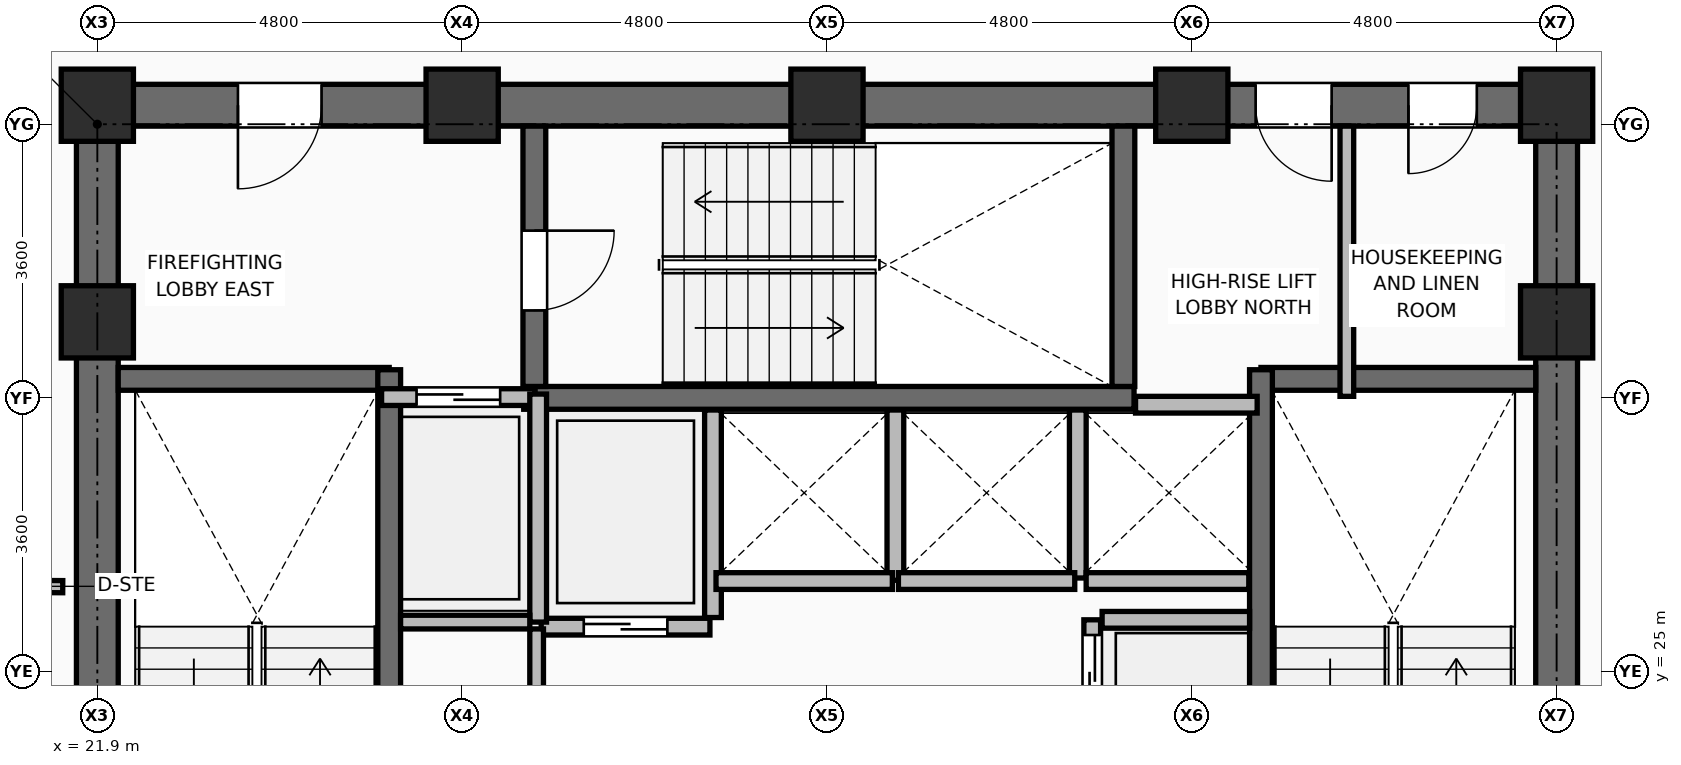
"""IFC4 building model, lengths in metres.
Left out: names, types, materials, properties, quantities, classifications, styles, units other than length and angle.
Written with IfcOpenShell. Run it as: python <this file> out.ifc"""

import sys

from ifc_helpers import new_model, si_unit, direction, frame, frame_2d, origin, origin_2d, place, context, subcontext, project, spatial, rectangle, extrude, element, fill, save


model = new_model("IFC4")
c1 = context("Model", 3, precision=1e-05, world=origin(), true_north=direction((0.0, 1.0)))
c2 = subcontext(c1, "Body", "Model", "MODEL_VIEW")
j1 = project(units=[si_unit("LENGTHUNIT", "METRE"), si_unit("PLANEANGLEUNIT", "RADIAN")], contexts=[c1])
p1 = place(None, origin())
s1 = spatial("IfcSite", under=j1, at=p1, CompositionType="ELEMENT")
p2 = place(p1, origin())
s2 = spatial("IfcBuilding", under=s1, at=p2, CompositionType="ELEMENT")
p3 = place(p2, frame((0.0, 0.0, 168.45)))
s3 = spatial("IfcBuildingStorey", under=s2, at=p3, CompositionType="ELEMENT", Elevation=168.45)
for number, where, z_axis, x_axis in (
    (1, (21.9, 29.6, 0.0), (0.0, 0.0, 1.0), (1.0, 0.0, 0.0)),
    (2, (41.1, 29.6, 0.0), (0.0, 0.0, 1.0), (1.0, 0.0, 0.0)),
    (3, (21.9, 32.45, 0.0), (0.0, 0.0, 1.0), (1.0, 0.0, 0.0)),
    (4, (26.7, 32.45, 0.0), (0.0, 0.0, 1.0), (1.0, 0.0, 0.0)),
    (5, (31.5, 32.45, 0.0), (0.0, 0.0, 1.0), (1.0, 0.0, 0.0)),
    (6, (36.3, 32.45, 0.0), (0.0, 0.0, 1.0), (1.0, 0.0, 0.0)),
    (7, (41.1, 32.45, 0.0), (0.0, 0.0, 1.0), (1.0, 0.0, 0.0)),
):
    element("IfcColumn", number, at=place(p3, frame(where, z_axis=z_axis, x_axis=x_axis)), inside=s3, PredefinedType="COLUMN", context=c2, shape_type="SweptSolid", body=[
        extrude(rectangle(XDim=0.95, YDim=0.95, at=origin_2d()), origin(), (0.0, 0.0, 1.0), 3.75),
    ])
p4 = place(p3, frame((30.0, 25.71, 0.0), z_axis=(0.0, 0.0, 1.0), x_axis=(0.0, 1.0, 0.0)))
e8 = element("IfcWall", 8, at=p4, inside=s3, PredefinedType="PARTITIONING", context=c2, shape_type="SweptSolid", body=[
    extrude(rectangle(XDim=2.73, YDim=0.22, at=frame_2d((1.365, 0.0))), origin(), (0.0, 0.0, 1.0), 3.545),
])
p5 = place(p3, frame((32.4, 26.2, 0.0), z_axis=(0.0, 0.0, 1.0), x_axis=(0.0, 1.0, 0.0)))
e9 = element("IfcWall", 9, at=p5, inside=s3, PredefinedType="PARTITIONING", context=c2, shape_type="SweptSolid", body=[
    extrude(rectangle(XDim=2.24, YDim=0.22, at=frame_2d((1.12, 0.0))), origin(), (0.0, 0.0, 1.0), 3.545),
])
p6 = place(p3, frame((34.8, 26.23, 0.0), z_axis=(0.0, 0.0, 1.0), x_axis=(0.0, 1.0, 0.0)))
e10 = element("IfcWall", 10, at=p6, inside=s3, PredefinedType="PARTITIONING", context=c2, shape_type="SweptSolid", body=[
    extrude(rectangle(XDim=2.21, YDim=0.22, at=frame_2d((1.105, 0.0))), origin(), (0.0, 0.0, 1.0), 3.545),
])
p7 = place(p3, frame((34.91, 26.19, 0.0), z_axis=(0.0, 0.0, 1.0), x_axis=(1.0, 0.0, 0.0)))
e11 = element("IfcWall", 11, at=p7, inside=s3, PredefinedType="PARTITIONING", context=c2, shape_type="SweptSolid", body=[
    extrude(rectangle(XDim=2.14, YDim=0.22, at=frame_2d((1.07, 0.0))), origin(), (0.0, 0.0, 1.0), 3.545),
])
p8 = place(p3, frame((21.625, 32.45, 0.0), z_axis=(0.0, 0.0, 1.0), x_axis=(1.0, 0.0, 0.0)))
e12 = element("IfcWall", 12, at=p8, inside=s3, PredefinedType="SHEAR", context=c2, shape_type="SweptSolid", body=[
    extrude(rectangle(XDim=19.75, YDim=0.55, at=frame_2d((9.875, 0.0))), origin(), (0.0, 0.0, 1.0), 3.57),
])
p9 = place(p8, frame((2.125, 0.0, 0.0)))
e13 = element("IfcOpeningElement", 13, at=p9, cuts=e12, PredefinedType="OPENING", context=c2, shape_type="SweptSolid", body=[
    extrude(rectangle(XDim=1.1, YDim=2.1, at=frame_2d((0.55, 1.05))), frame((0.0, 0.285, 0.0), z_axis=(0.0, -1.0, 0.0), x_axis=(1.0, 0.0, 0.0)), (0.0, 0.0, 1.0), 0.57),
])
p10 = place(p8, frame((15.515, 0.0, 0.0)))
e14 = element("IfcOpeningElement", 14, at=p10, cuts=e12, PredefinedType="OPENING", context=c2, shape_type="SweptSolid", body=[
    extrude(rectangle(XDim=1.0, YDim=2.1, at=frame_2d((0.5, 1.05))), frame((0.0, 0.285, 0.0), z_axis=(0.0, -1.0, 0.0), x_axis=(1.0, 0.0, 0.0)), (0.0, 0.0, 1.0), 0.57),
])
p11 = place(p8, frame((17.525, 0.0, 0.0)))
e15 = element("IfcOpeningElement", 15, at=p11, cuts=e12, PredefinedType="OPENING", context=c2, shape_type="SweptSolid", body=[
    extrude(rectangle(XDim=0.9, YDim=2.1, at=frame_2d((0.45, 1.05))), frame((0.0, 0.285, 0.0), z_axis=(0.0, -1.0, 0.0), x_axis=(1.0, 0.0, 0.0)), (0.0, 0.0, 1.0), 0.57),
])
p12 = place(p3, frame((21.9, 18.075, 0.0), z_axis=(0.0, 0.0, 1.0), x_axis=(0.0, 1.0, 0.0)))
e16 = element("IfcWall", 16, at=p12, inside=s3, PredefinedType="SHEAR", context=c2, shape_type="SweptSolid", body=[
    extrude(rectangle(XDim=14.1, YDim=0.55, at=frame_2d((7.05, 0.0))), origin(), (0.0, 0.0, 1.0), 3.57),
])
p13 = place(p3, frame((41.1, 18.075, 0.0), z_axis=(0.0, 0.0, 1.0), x_axis=(0.0, 1.0, 0.0)))
e17 = element("IfcWall", 17, at=p13, inside=s3, PredefinedType="SHEAR", context=c2, shape_type="SweptSolid", body=[
    extrude(rectangle(XDim=14.1, YDim=0.55, at=frame_2d((7.05, 0.0))), origin(), (0.0, 0.0, 1.0), 3.57),
])
p14 = place(p13, frame((3.385, 0.0, 0.0)))
e18 = element("IfcOpeningElement", 18, at=p14, cuts=e17, PredefinedType="OPENING", context=c2, shape_type="SweptSolid", body=[
    extrude(rectangle(XDim=1.05, YDim=2.1, at=frame_2d((0.525, 1.05))), frame((0.0, 0.285, 0.0), z_axis=(0.0, -1.0, 0.0), x_axis=(1.0, 0.0, 0.0)), (0.0, 0.0, 1.0), 0.57),
])
p15 = place(p3, frame((22.175, 28.85, 0.0), z_axis=(0.0, 0.0, 1.0), x_axis=(1.0, 0.0, 0.0)))
e19 = element("IfcWall", 19, at=p15, inside=s3, PredefinedType="SHEAR", context=c2, shape_type="SweptSolid", body=[
    extrude(rectangle(XDim=3.565, YDim=0.3, at=frame_2d((1.782, 0.0))), origin(), (0.0, 0.0, 1.0), 3.57),
])
p16 = place(p3, frame((25.74, 20.98, 0.0), z_axis=(0.0, 0.0, 1.0), x_axis=(0.0, 1.0, 0.0)))
e20 = element("IfcWall", 20, at=p16, inside=s3, PredefinedType="SHEAR", context=c2, shape_type="SweptSolid", body=[
    extrude(rectangle(XDim=7.99, YDim=0.3, at=frame_2d((3.995, 0.0))), origin(), (0.0, 0.0, 1.0), 3.57),
])
p17 = place(p3, frame((37.21, 28.85, 0.0), z_axis=(0.0, 0.0, 1.0), x_axis=(1.0, 0.0, 0.0)))
e21 = element("IfcWall", 21, at=p17, inside=s3, PredefinedType="SHEAR", context=c2, shape_type="SweptSolid", body=[
    extrude(rectangle(XDim=3.615, YDim=0.3, at=frame_2d((1.808, 0.0))), origin(), (0.0, 0.0, 1.0), 3.57),
])
p18 = place(p3, frame((37.21, 20.98, 0.0), z_axis=(0.0, 0.0, 1.0), x_axis=(0.0, 1.0, 0.0)))
e22 = element("IfcWall", 22, at=p18, inside=s3, PredefinedType="SHEAR", context=c2, shape_type="SweptSolid", body=[
    extrude(rectangle(XDim=7.99, YDim=0.3, at=frame_2d((3.995, 0.0))), origin(), (0.0, 0.0, 1.0), 3.57),
])
p19 = place(p3, frame((27.51, 28.6, 0.0), z_axis=(0.0, 0.0, 1.0), x_axis=(1.0, 0.0, 0.0)))
e23 = element("IfcWall", 23, at=p19, inside=s3, PredefinedType="SHEAR", context=c2, shape_type="SweptSolid", body=[
    extrude(rectangle(XDim=8.03, YDim=0.3, at=frame_2d((4.015, 0.0))), origin(), (0.0, 0.0, 1.0), 3.57),
])
p20 = place(p3, frame((27.65, 28.75, 0.0), z_axis=(0.0, 0.0, 1.0), x_axis=(0.0, 1.0, 0.0)))
e24 = element("IfcWall", 24, at=p20, inside=s3, PredefinedType="SHEAR", context=c2, shape_type="SweptSolid", body=[
    extrude(rectangle(XDim=3.425, YDim=0.3, at=frame_2d((1.712, 0.0))), origin(), (0.0, 0.0, 1.0), 3.57),
])
p21 = place(p20, frame((1.0, 0.0, 0.0)))
e25 = element("IfcOpeningElement", 25, at=p21, cuts=e24, PredefinedType="OPENING", context=c2, shape_type="SweptSolid", body=[
    extrude(rectangle(XDim=1.05, YDim=2.1, at=frame_2d((0.525, 1.05))), frame((0.0, 0.16, 0.0), z_axis=(0.0, -1.0, 0.0), x_axis=(1.0, 0.0, 0.0)), (0.0, 0.0, 1.0), 0.32),
])
p22 = place(p3, frame((35.4, 28.75, 0.0), z_axis=(0.0, 0.0, 1.0), x_axis=(0.0, 1.0, 0.0)))
e26 = element("IfcWall", 26, at=p22, inside=s3, PredefinedType="SHEAR", context=c2, shape_type="SweptSolid", body=[
    extrude(rectangle(XDim=3.425, YDim=0.3, at=frame_2d((1.712, 0.0))), origin(), (0.0, 0.0, 1.0), 3.57),
])
p23 = place(p3, frame((25.64, 28.61, 0.0), z_axis=(0.0, 0.0, 1.0), x_axis=(1.0, 0.0, 0.0)))
e27 = element("IfcWall", 27, at=p23, inside=s3, PredefinedType="PARTITIONING", context=c2, shape_type="SweptSolid", body=[
    extrude(rectangle(XDim=2.02, YDim=0.22, at=frame_2d((1.01, 0.0))), origin(), (0.0, 0.0, 1.0), 3.55),
])
p24 = place(p23, frame((0.46, 0.0, 0.0)))
e28 = element("IfcOpeningElement", 28, at=p24, cuts=e27, PredefinedType="OPENING", context=c2, shape_type="SweptSolid", body=[
    extrude(rectangle(XDim=1.1, YDim=2.2, at=frame_2d((0.55, 1.1))), frame((0.0, 0.12, 0.0), z_axis=(0.0, -1.0, 0.0), x_axis=(1.0, 0.0, 0.0)), (0.0, 0.0, 1.0), 0.24),
])
p25 = place(p3, frame((27.74, 25.59, 0.0), z_axis=(0.0, 0.0, 1.0), x_axis=(1.0, 0.0, 0.0)))
e29 = element("IfcWall", 29, at=p25, inside=s3, PredefinedType="PARTITIONING", context=c2, shape_type="SweptSolid", body=[
    extrude(rectangle(XDim=2.22, YDim=0.22, at=frame_2d((1.11, 0.0))), origin(), (0.0, 0.0, 1.0), 3.55),
])
p26 = place(p25, frame((0.56, 0.0, 0.0)))
e30 = element("IfcOpeningElement", 30, at=p26, cuts=e29, PredefinedType="OPENING", context=c2, shape_type="SweptSolid", body=[
    extrude(rectangle(XDim=1.1, YDim=2.2, at=frame_2d((0.55, 1.1))), frame((0.0, 0.12, 0.0), z_axis=(0.0, -1.0, 0.0), x_axis=(1.0, 0.0, 0.0)), (0.0, 0.0, 1.0), 0.24),
])
for number, where, z_axis, x_axis in (
    (31, (30.04, 26.19, 0.0), (0.0, 0.0, 1.0), (1.0, 0.0, 0.0)),
    (32, (32.44, 26.19, 0.0), (0.0, 0.0, 1.0), (1.0, 0.0, 0.0)),
):
    element("IfcWall", number, at=place(p3, frame(where, z_axis=z_axis, x_axis=x_axis)), inside=s3, PredefinedType="PARTITIONING", context=c2, shape_type="SweptSolid", body=[
        extrude(rectangle(XDim=2.32, YDim=0.22, at=frame_2d((1.16, 0.0))), origin(), (0.0, 0.0, 1.0), 3.55),
    ])
p27 = place(p3, frame((35.56, 28.51, 0.0), z_axis=(0.0, 0.0, 1.0), x_axis=(1.0, 0.0, 0.0)))
e33 = element("IfcWall", 33, at=p27, inside=s3, PredefinedType="PARTITIONING", context=c2, shape_type="SweptSolid", body=[
    extrude(rectangle(XDim=1.6, YDim=0.22, at=frame_2d((0.8, 0.0))), origin(), (0.0, 0.0, 1.0), 3.55),
])
p28 = place(p3, frame((34.99, 24.18, 0.0), z_axis=(0.0, 0.0, 1.0), x_axis=(0.0, 1.0, 0.0)))
e34 = element("IfcWall", 34, at=p28, inside=s3, PredefinedType="PARTITIONING", context=c2, shape_type="SweptSolid", body=[
    extrude(rectangle(XDim=1.5, YDim=0.22, at=frame_2d((0.75, 0.0))), origin(), (0.0, 0.0, 1.0), 3.55),
])
p29 = place(p28, frame((0.2, 0.0, 0.0)))
e35 = element("IfcOpeningElement", 35, at=p29, cuts=e34, PredefinedType="OPENING", context=c2, shape_type="SweptSolid", body=[
    extrude(rectangle(XDim=1.1, YDim=2.2, at=frame_2d((0.55, 1.1))), frame((0.0, 0.12, 0.0), z_axis=(0.0, -1.0, 0.0), x_axis=(1.0, 0.0, 0.0)), (0.0, 0.0, 1.0), 0.24),
])
p30 = place(p3, frame((27.7, 25.65, 0.0), z_axis=(0.0, 0.0, 1.0), x_axis=(0.0, 1.0, 0.0)))
e36 = element("IfcWall", 36, at=p30, inside=s3, PredefinedType="PARTITIONING", context=c2, shape_type="SweptSolid", body=[
    extrude(rectangle(XDim=3.0, YDim=0.22, at=frame_2d((1.5, 0.0))), origin(), (0.0, 0.0, 1.0), 3.55),
])
p31 = place(p3, frame((35.12, 25.68, 0.0), z_axis=(0.0, 0.0, 1.0), x_axis=(1.0, 0.0, 0.0)))
e37 = element("IfcWall", 37, at=p31, inside=s3, PredefinedType="PARTITIONING", context=c2, shape_type="SweptSolid", body=[
    extrude(rectangle(XDim=1.94, YDim=0.22, at=frame_2d((0.97, 0.0))), origin(), (0.0, 0.0, 1.0), 3.55),
])
p32 = place(p3, frame((25.89, 25.65, 0.0), z_axis=(0.0, 0.0, 1.0), x_axis=(1.0, 0.0, 0.0)))
e38 = element("IfcWall", 38, at=p32, inside=s3, PredefinedType="PARTITIONING", context=c2, shape_type="SweptSolid", body=[
    extrude(rectangle(XDim=1.7, YDim=0.18, at=frame_2d((0.85, 0.0))), origin(), (0.0, 0.0, 1.0), 3.55),
])
p33 = place(p3, frame((27.68, 24.16, 0.0), z_axis=(0.0, 0.0, 1.0), x_axis=(0.0, 1.0, 0.0)))
e39 = element("IfcWall", 39, at=p33, inside=s3, PredefinedType="PARTITIONING", context=c2, shape_type="SweptSolid", body=[
    extrude(rectangle(XDim=1.4, YDim=0.18, at=frame_2d((0.7, 0.0))), origin(), (0.0, 0.0, 1.0), 3.55),
])
p34 = place(p3, frame((38.34, 28.62, 0.0), z_axis=(0.0, 0.0, 1.0), x_axis=(0.0, 1.0, 0.0)))
e40 = element("IfcWall", 40, at=p34, inside=s3, PredefinedType="PARTITIONING", context=c2, shape_type="SweptSolid", body=[
    extrude(rectangle(XDim=3.555, YDim=0.18, at=frame_2d((1.777, 0.0))), origin(), (0.0, 0.0, 1.0), 3.55),
])
p35 = place(p3, frame((21.445, 26.116, 0.0), z_axis=(0.0, 0.0, 1.0), x_axis=(-0.99998212632, 0.005978882852, 0.0)))
e41 = element("IfcWall", 41, at=p35, inside=s3, PredefinedType="PARTITIONING", context=c2, shape_type="SweptSolid", body=[
    extrude(rectangle(XDim=4.369, YDim=0.16, at=frame_2d((2.185, 0.0))), origin(), (0.0, 0.0, 1.0), 2.595),
])
p36 = place(p35, frame((0.16, 0.0, 0.0)))
e42 = element("IfcOpeningElement", 42, at=p36, cuts=e41, PredefinedType="OPENING", context=c2, shape_type="SweptSolid", body=[
    extrude(rectangle(XDim=1.2, YDim=2.1, at=frame_2d((0.6, 1.05))), frame((0.0, 0.09, 0.0), z_axis=(0.0, -1.0, 0.0), x_axis=(1.0, 0.0, 0.0)), (0.0, 0.0, 1.0), 0.18),
])
p37 = place(p21, frame((1.05, 0.0, 0.0), z_axis=(0.0, 0.0, 1.0), x_axis=(-1.0, 0.0, 0.0)))
e43 = element("IfcDoor", 43, at=p37, inside=s3, OperationType="SINGLE_SWING_LEFT", PredefinedType="DOOR", context=c2, shape_type="SweptSolid", body=[
    extrude(rectangle(XDim=1.05, YDim=2.1, at=frame_2d((0.525, 1.05))), frame((0.0, 0.025, 0.0), z_axis=(0.0, -1.0, 0.0), x_axis=(1.0, 0.0, 0.0)), (0.0, 0.0, 1.0), 0.05),
])
fill(e25, e43)
p38 = place(p24, origin())
e44 = element("IfcDoor", 44, at=p38, inside=s3, OperationType="DOUBLE_DOOR_SLIDING", PredefinedType="DOOR", context=c2, shape_type="SweptSolid", body=[
    extrude(rectangle(XDim=1.1, YDim=2.2, at=frame_2d((0.55, 1.1))), frame((0.0, 0.025, 0.0), z_axis=(0.0, -1.0, 0.0), x_axis=(1.0, 0.0, 0.0)), (0.0, 0.0, 1.0), 0.05),
])
fill(e28, e44)
p39 = place(p26, frame((1.1, 0.0, 0.0), z_axis=(0.0, 0.0, 1.0), x_axis=(-1.0, 0.0, 0.0)))
e45 = element("IfcDoor", 45, at=p39, inside=s3, OperationType="DOUBLE_DOOR_SLIDING", PredefinedType="DOOR", context=c2, shape_type="SweptSolid", body=[
    extrude(rectangle(XDim=1.1, YDim=2.2, at=frame_2d((0.55, 1.1))), frame((0.0, 0.025, 0.0), z_axis=(0.0, -1.0, 0.0), x_axis=(1.0, 0.0, 0.0)), (0.0, 0.0, 1.0), 0.05),
])
fill(e30, e45)
p40 = place(p29, origin())
e46 = element("IfcDoor", 46, at=p40, inside=s3, OperationType="DOUBLE_DOOR_SLIDING", PredefinedType="DOOR", context=c2, shape_type="SweptSolid", body=[
    extrude(rectangle(XDim=1.1, YDim=2.2, at=frame_2d((0.55, 1.1))), frame((0.0, 0.025, 0.0), z_axis=(0.0, -1.0, 0.0), x_axis=(1.0, 0.0, 0.0)), (0.0, 0.0, 1.0), 0.05),
])
fill(e35, e46)
p41 = place(p9, frame((1.1, 0.0, 0.0), z_axis=(0.0, 0.0, 1.0), x_axis=(-1.0, 0.0, 0.0)))
e47 = element("IfcDoor", 47, at=p41, inside=s3, OperationType="SINGLE_SWING_RIGHT", PredefinedType="DOOR", context=c2, shape_type="SweptSolid", body=[
    extrude(rectangle(XDim=1.1, YDim=2.1, at=frame_2d((0.55, 1.05))), frame((0.0, 0.025, 0.0), z_axis=(0.0, -1.0, 0.0), x_axis=(1.0, 0.0, 0.0)), (0.0, 0.0, 1.0), 0.05),
])
fill(e13, e47)
p42 = place(p10, frame((1.0, 0.0, 0.0), z_axis=(0.0, 0.0, 1.0), x_axis=(-1.0, 0.0, 0.0)))
e48 = element("IfcDoor", 48, at=p42, inside=s3, OperationType="SINGLE_SWING_LEFT", PredefinedType="DOOR", context=c2, shape_type="SweptSolid", body=[
    extrude(rectangle(XDim=1.0, YDim=2.1, at=frame_2d((0.5, 1.05))), frame((0.0, 0.025, 0.0), z_axis=(0.0, -1.0, 0.0), x_axis=(1.0, 0.0, 0.0)), (0.0, 0.0, 1.0), 0.05),
])
fill(e14, e48)
p43 = place(p11, frame((0.9, 0.0, 0.0), z_axis=(0.0, 0.0, 1.0), x_axis=(-1.0, 0.0, 0.0)))
e49 = element("IfcDoor", 49, at=p43, inside=s3, OperationType="SINGLE_SWING_RIGHT", PredefinedType="DOOR", context=c2, shape_type="SweptSolid", body=[
    extrude(rectangle(XDim=0.9, YDim=2.1, at=frame_2d((0.45, 1.05))), frame((0.0, 0.025, 0.0), z_axis=(0.0, -1.0, 0.0), x_axis=(1.0, 0.0, 0.0)), (0.0, 0.0, 1.0), 0.05),
])
fill(e15, e49)
save(model, sys.argv[1])
